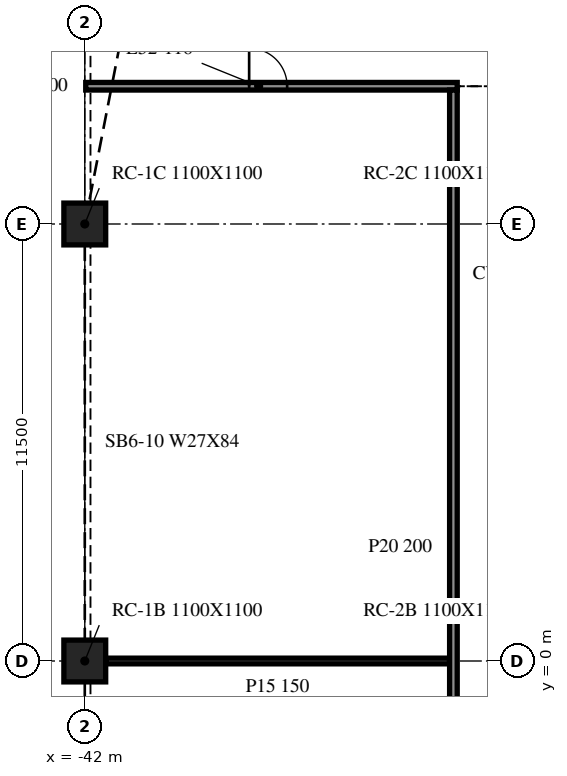
"""IFC4 building model, lengths in metres.
Left out: names, types, materials, properties, quantities, classifications, styles, units other than length and angle.
Written with IfcOpenShell. Run it as: python <this file> out.ifc"""

import sys

from ifc_helpers import new_model, si_unit, direction, frame, frame_2d, origin, origin_2d, place, context, subcontext, project, spatial, rectangle, extrude, element, fill, save


model = new_model("IFC4")
c1 = context("Model", 3, precision=1e-05, world=origin(), true_north=direction((0.0, 1.0)))
c2 = subcontext(c1, "Body", "Model", "MODEL_VIEW")
j1 = project(units=[si_unit("LENGTHUNIT", "METRE"), si_unit("PLANEANGLEUNIT", "RADIAN")], contexts=[c1])
p1 = place(None, origin())
s1 = spatial("IfcSite", under=j1, at=p1, CompositionType="ELEMENT")
p2 = place(p1, origin())
s2 = spatial("IfcBuilding", under=s1, at=p2, CompositionType="ELEMENT")
p3 = place(p2, frame((0.0, 0.0, 216.7)))
s3 = spatial("IfcBuildingStorey", under=s2, at=p3, CompositionType="ELEMENT", Elevation=216.7)
for number, where, z_axis, x_axis in (
    (1, (-42.0, 0.0, -0.34), (0.0, 0.0, 1.0), (1.0, 0.0, 0.0)),
    (2, (-42.0, 11.5, -0.34), (0.0, 0.0, 1.0), (1.0, 0.0, 0.0)),
):
    element("IfcColumn", number, at=place(p3, frame(where, z_axis=z_axis, x_axis=x_axis)), inside=s3, PredefinedType="COLUMN", context=c2, shape_type="SweptSolid", body=[
        extrude(rectangle(XDim=1.1, YDim=1.1, at=origin_2d()), origin(), (0.0, 0.0, 1.0), 3.8),
    ])
p4 = place(p3, frame((-41.45, 0.0, 0.0), z_axis=(0.0, 0.0, 1.0), x_axis=(1.0, 0.0, 0.0)))
e3 = element("IfcWall", 3, at=p4, inside=s3, PredefinedType="PARTITIONING", context=c2, shape_type="SweptSolid", body=[
    extrude(rectangle(XDim=9.05, YDim=0.15, at=frame_2d((4.525, 0.0))), origin(), (0.0, 0.0, 1.0), 3.46),
])
p5 = place(p3, frame((-41.975, 15.125, 0.0), z_axis=(0.0, 0.0, 1.0), x_axis=(1.0, 0.0, 0.0)))
e4 = element("IfcWall", 4, at=p5, inside=s3, PredefinedType="PARTITIONING", context=c2, shape_type="SweptSolid", body=[
    extrude(rectangle(XDim=9.775, YDim=0.2, at=frame_2d((4.888, 0.0))), origin(), (0.0, 0.0, 1.0), 3.46),
])
p6 = place(p5, frame((4.3, 0.0, 0.0)))
e5 = element("IfcOpeningElement", 5, at=p6, cuts=e4, PredefinedType="OPENING", context=c2, shape_type="SweptSolid", body=[
    extrude(rectangle(XDim=1.0, YDim=2.1, at=frame_2d((0.5, 1.05))), frame((0.0, 0.11, 0.0), z_axis=(0.0, -1.0, 0.0), x_axis=(1.0, 0.0, 0.0)), (0.0, 0.0, 1.0), 0.22),
])
p7 = place(p3, frame((-32.3, -9.025, 0.0), z_axis=(0.0, 0.0, 1.0), x_axis=(0.0, 1.0, 0.0)))
e6 = element("IfcWall", 6, at=p7, inside=s3, PredefinedType="PARTITIONING", context=c2, shape_type="SweptSolid", body=[
    extrude(rectangle(XDim=24.05, YDim=0.2, at=frame_2d((12.025, 0.0))), origin(), (0.0, 0.0, 1.0), 3.46),
])
p8 = place(p6, origin())
e7 = element("IfcDoor", 7, at=p8, inside=s3, OperationType="SINGLE_SWING_RIGHT", PredefinedType="DOOR", context=c2, shape_type="SweptSolid", body=[
    extrude(rectangle(XDim=1.0, YDim=2.1, at=frame_2d((0.5, 1.05))), frame((0.0, 0.025, 0.0), z_axis=(0.0, -1.0, 0.0), x_axis=(1.0, 0.0, 0.0)), (0.0, 0.0, 1.0), 0.05),
])
fill(e5, e7)
save(model, sys.argv[1])
